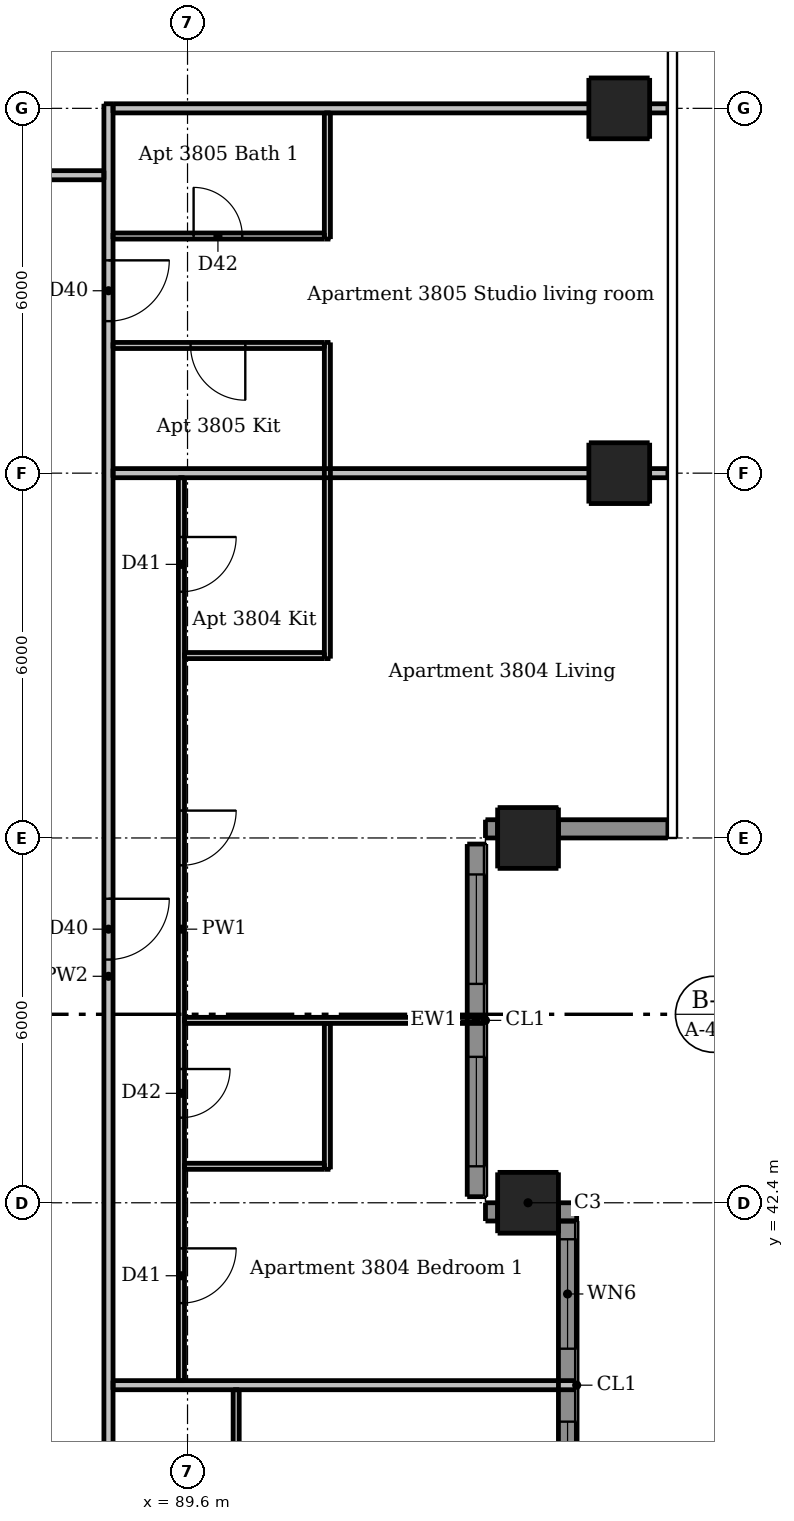
"""IFC4 building model, lengths in metres.
Left out: names, types, materials, properties, quantities, classifications, styles, units other than length and angle.
Written with IfcOpenShell. Run it as: python <this file> out.ifc"""

import sys

from ifc_helpers import new_model, si_unit, direction, frame, frame_2d, origin, origin_2d, place, context, subcontext, project, spatial, rectangle, extrude, element, fill, save


model = new_model("IFC4")
c1 = context("Model", 3, precision=1e-05, world=origin(), true_north=direction((0.0, 1.0)))
c2 = subcontext(c1, "Body", "Model", "MODEL_VIEW")
j1 = project(units=[si_unit("LENGTHUNIT", "METRE"), si_unit("PLANEANGLEUNIT", "RADIAN")], contexts=[c1])
p1 = place(None, origin())
s1 = spatial("IfcSite", under=j1, at=p1, CompositionType="ELEMENT")
p2 = place(p1, origin())
s2 = spatial("IfcBuilding", under=s1, at=p2, CompositionType="ELEMENT")
p3 = place(p2, frame((0.0, 0.0, 143.8)))
s3 = spatial("IfcBuildingStorey", under=s2, at=p3, CompositionType="ELEMENT", Elevation=143.8)
for number, where, z_axis, x_axis in (
    (1, (95.2, 42.4, 0.0), (0.0, 0.0, 1.0), (1.0, 0.0, 0.0)),
    (2, (95.2, 48.4, 0.0), (0.0, 0.0, 1.0), (1.0, 0.0, 0.0)),
    (3, (96.7, 54.4, 0.0), (0.0, 0.0, 1.0), (1.0, 0.0, 0.0)),
    (4, (96.7, 60.4, 0.0), (0.0, 0.0, 1.0), (1.0, 0.0, 0.0)),
):
    element("IfcColumn", number, at=place(p3, frame(where, z_axis=z_axis, x_axis=x_axis)), inside=s3, PredefinedType="COLUMN", context=c2, shape_type="SweptSolid", body=[
        extrude(rectangle(XDim=1.0, YDim=1.0, at=origin_2d()), origin(), (0.0, 0.0, 1.0), 3.05),
    ])
p4 = place(p3, frame((96.0, 42.25, 0.0), z_axis=(0.0, 0.0, 1.0), x_axis=(-1.0, 0.0, 0.0)))
e5 = element("IfcWall", 5, at=p4, inside=s3, PredefinedType="SOLIDWALL", context=c2, shape_type="SweptSolid", body=[
    extrude(rectangle(XDim=0.3, YDim=0.3, at=frame_2d((0.15, 0.0))), origin(), (0.0, 0.0, 1.0), 3.05),
])
for number, where, z_axis, x_axis in (
    (6, (94.7, 42.25, 0.0), (0.0, 0.0, 1.0), (-1.0, 0.0, 0.0)),
    (7, (94.5, 48.55, 0.0), (0.0, 0.0, 1.0), (1.0, 0.0, 0.0)),
):
    element("IfcWall", number, at=place(p3, frame(where, z_axis=z_axis, x_axis=x_axis)), inside=s3, PredefinedType="SOLIDWALL", context=c2, shape_type="SweptSolid", body=[
        extrude(rectangle(XDim=0.2, YDim=0.3, at=frame_2d((0.1, 0.0))), origin(), (0.0, 0.0, 1.0), 3.05),
    ])
p5 = place(p3, frame((95.7, 48.55, 0.0), z_axis=(0.0, 0.0, 1.0), x_axis=(1.0, 0.0, 0.0)))
e8 = element("IfcWall", 8, at=p5, inside=s3, PredefinedType="SOLIDWALL", context=c2, shape_type="SweptSolid", body=[
    extrude(rectangle(XDim=1.8, YDim=0.3, at=frame_2d((0.9, 0.0))), origin(), (0.0, 0.0, 1.0), 3.05),
])
p6 = place(p3, frame((95.85, 36.7, 0.0), z_axis=(0.0, 0.0, 1.0), x_axis=(0.0, 1.0, 0.0)))
e9 = element("IfcWall", 9, at=p6, inside=s3, PredefinedType="SOLIDWALL", context=c2, shape_type="SweptSolid", body=[
    extrude(rectangle(XDim=5.4, YDim=0.3, at=frame_2d((2.7, 0.0))), origin(), (0.0, 0.0, 1.0), 3.05),
])
p7 = place(p6, frame((0.3, 0.0, 0.15)))
e10 = element("IfcOpeningElement", 10, at=p7, cuts=e9, PredefinedType="OPENING", context=c2, shape_type="SweptSolid", body=[
    extrude(rectangle(XDim=1.8, YDim=2.1, at=frame_2d((0.9, 1.05))), frame((0.0, 0.16, 0.0), z_axis=(0.0, -1.0, 0.0), x_axis=(1.0, 0.0, 0.0)), (0.0, 0.0, 1.0), 0.32),
])
p8 = place(p6, frame((3.3, 0.0, 0.15)))
e11 = element("IfcOpeningElement", 11, at=p8, cuts=e9, PredefinedType="OPENING", context=c2, shape_type="SweptSolid", body=[
    extrude(rectangle(XDim=1.8, YDim=2.1, at=frame_2d((0.9, 1.05))), frame((0.0, 0.16, 0.0), z_axis=(0.0, -1.0, 0.0), x_axis=(1.0, 0.0, 0.0)), (0.0, 0.0, 1.0), 0.32),
])
p9 = place(p3, frame((94.35, 42.5, 0.0), z_axis=(0.0, 0.0, 1.0), x_axis=(0.0, 1.0, 0.0)))
e12 = element("IfcWall", 12, at=p9, inside=s3, PredefinedType="SOLIDWALL", context=c2, shape_type="SweptSolid", body=[
    extrude(rectangle(XDim=5.8, YDim=0.3, at=frame_2d((2.9, 0.0))), origin(), (0.0, 0.0, 1.0), 3.05),
])
p10 = place(p9, frame((0.5, 0.0, 0.15)))
e13 = element("IfcOpeningElement", 13, at=p10, cuts=e12, PredefinedType="OPENING", context=c2, shape_type="SweptSolid", body=[
    extrude(rectangle(XDim=1.8, YDim=2.1, at=frame_2d((0.9, 1.05))), frame((0.0, 0.16, 0.0), z_axis=(0.0, -1.0, 0.0), x_axis=(1.0, 0.0, 0.0)), (0.0, 0.0, 1.0), 0.32),
])
p11 = place(p9, frame((3.5, 0.0, 0.15)))
e14 = element("IfcOpeningElement", 14, at=p11, cuts=e12, PredefinedType="OPENING", context=c2, shape_type="SweptSolid", body=[
    extrude(rectangle(XDim=1.8, YDim=2.1, at=frame_2d((0.9, 1.05))), frame((0.0, 0.16, 0.0), z_axis=(0.0, -1.0, 0.0), x_axis=(1.0, 0.0, 0.0)), (0.0, 0.0, 1.0), 0.32),
])
p12 = place(p3, frame((89.5, 54.325, 0.0), z_axis=(0.0, 0.0, 1.0), x_axis=(0.0, -1.0, 0.0)))
e15 = element("IfcWall", 15, at=p12, inside=s3, PredefinedType="PARTITIONING", context=c2, shape_type="SweptSolid", body=[
    extrude(rectangle(XDim=14.85, YDim=0.1, at=frame_2d((7.425, 0.0))), origin(), (0.0, 0.0, 1.0), 3.05),
])
p13 = place(p12, frame((5.475, 0.0, 0.0)))
e16 = element("IfcOpeningElement", 16, at=p13, cuts=e15, PredefinedType="OPENING", context=c2, shape_type="SweptSolid", body=[
    extrude(rectangle(XDim=0.9, YDim=2.1, at=frame_2d((0.45, 1.05))), frame((0.0, 0.06, 0.0), z_axis=(0.0, -1.0, 0.0), x_axis=(1.0, 0.0, 0.0)), (0.0, 0.0, 1.0), 0.12),
])
p14 = place(p12, frame((0.975, 0.0, 0.0)))
e17 = element("IfcOpeningElement", 17, at=p14, cuts=e15, PredefinedType="OPENING", context=c2, shape_type="SweptSolid", body=[
    extrude(rectangle(XDim=0.9, YDim=2.1, at=frame_2d((0.45, 1.05))), frame((0.0, 0.06, 0.0), z_axis=(0.0, -1.0, 0.0), x_axis=(1.0, 0.0, 0.0)), (0.0, 0.0, 1.0), 0.12),
])
p15 = place(p12, frame((12.675, 0.0, 0.0)))
e18 = element("IfcOpeningElement", 18, at=p15, cuts=e15, PredefinedType="OPENING", context=c2, shape_type="SweptSolid", body=[
    extrude(rectangle(XDim=0.9, YDim=2.1, at=frame_2d((0.45, 1.05))), frame((0.0, 0.06, 0.0), z_axis=(0.0, -1.0, 0.0), x_axis=(1.0, 0.0, 0.0)), (0.0, 0.0, 1.0), 0.12),
])
p16 = place(p12, frame((9.725, 0.0, 0.0)))
e19 = element("IfcOpeningElement", 19, at=p16, cuts=e15, PredefinedType="OPENING", context=c2, shape_type="SweptSolid", body=[
    extrude(rectangle(XDim=0.8, YDim=2.1, at=frame_2d((0.4, 1.05))), frame((0.0, 0.06, 0.0), z_axis=(0.0, -1.0, 0.0), x_axis=(1.0, 0.0, 0.0)), (0.0, 0.0, 1.0), 0.12),
])
p17 = place(p3, frame((90.4, 33.45, 0.0), z_axis=(0.0, 0.0, 1.0), x_axis=(0.0, 1.0, 0.0)))
e20 = element("IfcWall", 20, at=p17, inside=s3, PredefinedType="PARTITIONING", context=c2, shape_type="SweptSolid", body=[
    extrude(rectangle(XDim=5.875, YDim=0.1, at=frame_2d((2.938, 0.0))), origin(), (0.0, 0.0, 1.0), 3.05),
])
p18 = place(p17, frame((3.75, 0.0, 0.0)))
e21 = element("IfcOpeningElement", 21, at=p18, cuts=e20, PredefinedType="OPENING", context=c2, shape_type="SweptSolid", body=[
    extrude(rectangle(XDim=0.8, YDim=2.1, at=frame_2d((0.4, 1.05))), frame((0.0, 0.06, 0.0), z_axis=(0.0, -1.0, 0.0), x_axis=(1.0, 0.0, 0.0)), (0.0, 0.0, 1.0), 0.12),
])
p19 = place(p3, frame((91.9, 42.95, 0.0), z_axis=(0.0, 0.0, 1.0), x_axis=(0.0, 1.0, 0.0)))
e22 = element("IfcWall", 22, at=p19, inside=s3, PredefinedType="PARTITIONING", context=c2, shape_type="SweptSolid", body=[
    extrude(rectangle(XDim=2.4, YDim=0.1, at=frame_2d((1.2, 0.0))), origin(), (0.0, 0.0, 1.0), 3.05),
])
p20 = place(p3, frame((91.9, 51.35, 0.0), z_axis=(0.0, 0.0, 1.0), x_axis=(0.0, 1.0, 0.0)))
e23 = element("IfcWall", 23, at=p20, inside=s3, PredefinedType="PARTITIONING", context=c2, shape_type="SweptSolid", body=[
    extrude(rectangle(XDim=5.2, YDim=0.1, at=frame_2d((2.6, 0.0))), origin(), (0.0, 0.0, 1.0), 3.05),
])
p21 = place(p3, frame((91.9, 58.25, 0.0), z_axis=(0.0, 0.0, 1.0), x_axis=(0.0, 1.0, 0.0)))
e24 = element("IfcWall", 24, at=p21, inside=s3, PredefinedType="PARTITIONING", context=c2, shape_type="SweptSolid", body=[
    extrude(rectangle(XDim=2.075, YDim=0.1, at=frame_2d((1.038, 0.0))), origin(), (0.0, 0.0, 1.0), 3.05),
])
p22 = place(p3, frame((88.375, 58.3, 0.0), z_axis=(0.0, 0.0, 1.0), x_axis=(1.0, 0.0, 0.0)))
e25 = element("IfcWall", 25, at=p22, inside=s3, PredefinedType="PARTITIONING", context=c2, shape_type="SweptSolid", body=[
    extrude(rectangle(XDim=3.475, YDim=0.1, at=frame_2d((1.738, 0.0))), origin(), (0.0, 0.0, 1.0), 3.05),
])
p23 = place(p22, frame((1.325, 0.0, 0.0)))
e26 = element("IfcOpeningElement", 26, at=p23, cuts=e25, PredefinedType="OPENING", context=c2, shape_type="SweptSolid", body=[
    extrude(rectangle(XDim=0.8, YDim=2.1, at=frame_2d((0.4, 1.05))), frame((0.0, 0.06, 0.0), z_axis=(0.0, -1.0, 0.0), x_axis=(1.0, 0.0, 0.0)), (0.0, 0.0, 1.0), 0.12),
])
p24 = place(p3, frame((91.85, 56.5, 0.0), z_axis=(0.0, 0.0, 1.0), x_axis=(-1.0, 0.0, 0.0)))
e27 = element("IfcWall", 27, at=p24, inside=s3, PredefinedType="PARTITIONING", context=c2, shape_type="SweptSolid", body=[
    extrude(rectangle(XDim=3.475, YDim=0.1, at=frame_2d((1.738, 0.0))), origin(), (0.0, 0.0, 1.0), 3.05),
])
p25 = place(p24, frame((1.3, 0.0, 0.0)))
e28 = element("IfcOpeningElement", 28, at=p25, cuts=e27, PredefinedType="OPENING", context=c2, shape_type="SweptSolid", body=[
    extrude(rectangle(XDim=0.9, YDim=2.1, at=frame_2d((0.45, 1.05))), frame((0.0, 0.06, 0.0), z_axis=(0.0, -1.0, 0.0), x_axis=(1.0, 0.0, 0.0)), (0.0, 0.0, 1.0), 0.12),
])
p26 = place(p3, frame((89.55, 51.4, 0.0), z_axis=(0.0, 0.0, 1.0), x_axis=(1.0, 0.0, 0.0)))
e29 = element("IfcWall", 29, at=p26, inside=s3, PredefinedType="PARTITIONING", context=c2, shape_type="SweptSolid", body=[
    extrude(rectangle(XDim=2.3, YDim=0.1, at=frame_2d((1.15, 0.0))), origin(), (0.0, 0.0, 1.0), 3.05),
])
p27 = place(p3, frame((89.55, 45.4, 0.0), z_axis=(0.0, 0.0, 1.0), x_axis=(1.0, 0.0, 0.0)))
e30 = element("IfcWall", 30, at=p27, inside=s3, PredefinedType="PARTITIONING", context=c2, shape_type="SweptSolid", body=[
    extrude(rectangle(XDim=4.95, YDim=0.1, at=frame_2d((2.475, 0.0))), origin(), (0.0, 0.0, 1.0), 3.05),
])
p28 = place(p3, frame((89.55, 43.0, 0.0), z_axis=(0.0, 0.0, 1.0), x_axis=(1.0, 0.0, 0.0)))
e31 = element("IfcWall", 31, at=p28, inside=s3, PredefinedType="PARTITIONING", context=c2, shape_type="SweptSolid", body=[
    extrude(rectangle(XDim=2.3, YDim=0.1, at=frame_2d((1.15, 0.0))), origin(), (0.0, 0.0, 1.0), 3.05),
])
p29 = place(p3, frame((88.3, 60.475, 0.0), z_axis=(0.0, 0.0, 1.0), x_axis=(0.0, -1.0, 0.0)))
e32 = element("IfcWall", 32, at=p29, inside=s3, PredefinedType="PARTITIONING", context=c2, shape_type="SweptSolid", body=[
    extrude(rectangle(XDim=28.7, YDim=0.15, at=frame_2d((14.35, 0.0))), origin(), (0.0, 0.0, 1.0), 3.05),
])
p30 = place(p29, frame((27.425, 0.0, 0.0)))
e33 = element("IfcOpeningElement", 33, at=p30, cuts=e32, PredefinedType="OPENING", context=c2, shape_type="SweptSolid", body=[
    extrude(rectangle(XDim=1.0, YDim=2.1, at=frame_2d((0.5, 1.05))), frame((0.0, 0.085, 0.0), z_axis=(0.0, -1.0, 0.0), x_axis=(1.0, 0.0, 0.0)), (0.0, 0.0, 1.0), 0.17),
])
p31 = place(p29, frame((13.075, 0.0, 0.0)))
e34 = element("IfcOpeningElement", 34, at=p31, cuts=e32, PredefinedType="OPENING", context=c2, shape_type="SweptSolid", body=[
    extrude(rectangle(XDim=1.0, YDim=2.1, at=frame_2d((0.5, 1.05))), frame((0.0, 0.085, 0.0), z_axis=(0.0, -1.0, 0.0), x_axis=(1.0, 0.0, 0.0)), (0.0, 0.0, 1.0), 0.17),
])
p32 = place(p29, frame((2.575, 0.0, 0.0)))
e35 = element("IfcOpeningElement", 35, at=p32, cuts=e32, PredefinedType="OPENING", context=c2, shape_type="SweptSolid", body=[
    extrude(rectangle(XDim=1.0, YDim=2.1, at=frame_2d((0.5, 1.05))), frame((0.0, 0.085, 0.0), z_axis=(0.0, -1.0, 0.0), x_axis=(1.0, 0.0, 0.0)), (0.0, 0.0, 1.0), 0.17),
])
p33 = place(p3, frame((88.375, 60.4, 0.0), z_axis=(0.0, 0.0, 1.0), x_axis=(1.0, 0.0, 0.0)))
e36 = element("IfcWall", 36, at=p33, inside=s3, PredefinedType="PARTITIONING", context=c2, shape_type="SweptSolid", body=[
    extrude(rectangle(XDim=9.125, YDim=0.15, at=frame_2d((4.562, 0.0))), origin(), (0.0, 0.0, 1.0), 2.647),
])
p34 = place(p3, frame((59.675, 59.3, 0.0), z_axis=(0.0, 0.0, 1.0), x_axis=(1.0, 0.0, 0.0)))
e37 = element("IfcWall", 37, at=p34, inside=s3, PredefinedType="PARTITIONING", context=c2, shape_type="SweptSolid", body=[
    extrude(rectangle(XDim=28.55, YDim=0.15, at=frame_2d((14.275, 0.0))), origin(), (0.0, 0.0, 1.0), 3.05),
])
p35 = place(p34, frame((8.975, 0.0, 0.0)))
e38 = element("IfcOpeningElement", 38, at=p35, cuts=e37, PredefinedType="OPENING", context=c2, shape_type="SweptSolid", body=[
    extrude(rectangle(XDim=1.0, YDim=2.1, at=frame_2d((0.5, 1.05))), frame((0.0, 0.085, 0.0), z_axis=(0.0, -1.0, 0.0), x_axis=(1.0, 0.0, 0.0)), (0.0, 0.0, 1.0), 0.17),
])
p36 = place(p34, frame((25.775, 0.0, 0.0)))
e39 = element("IfcOpeningElement", 39, at=p36, cuts=e37, PredefinedType="OPENING", context=c2, shape_type="SweptSolid", body=[
    extrude(rectangle(XDim=1.0, YDim=2.1, at=frame_2d((0.5, 1.05))), frame((0.0, 0.085, 0.0), z_axis=(0.0, -1.0, 0.0), x_axis=(1.0, 0.0, 0.0)), (0.0, 0.0, 1.0), 0.17),
])
p37 = place(p3, frame((88.375, 54.4, 0.0), z_axis=(0.0, 0.0, 1.0), x_axis=(1.0, 0.0, 0.0)))
e40 = element("IfcWall", 40, at=p37, inside=s3, PredefinedType="PARTITIONING", context=c2, shape_type="SweptSolid", body=[
    extrude(rectangle(XDim=9.125, YDim=0.15, at=frame_2d((4.562, 0.0))), origin(), (0.0, 0.0, 1.0), 2.516),
])
p38 = place(p3, frame((88.375, 39.4, 0.0), z_axis=(0.0, 0.0, 1.0), x_axis=(1.0, 0.0, 0.0)))
e41 = element("IfcWall", 41, at=p38, inside=s3, PredefinedType="PARTITIONING", context=c2, shape_type="SweptSolid", body=[
    extrude(rectangle(XDim=7.625, YDim=0.15, at=frame_2d((3.812, 0.0))), origin(), (0.0, 0.0, 1.0), 3.05),
])
p39 = place(p7, origin())
e42 = element("IfcWindow", 42, at=p39, inside=s3, PartitioningType="DOUBLE_PANEL_VERTICAL", PredefinedType="WINDOW", context=c2, shape_type="SweptSolid", body=[
    extrude(rectangle(XDim=1.8, YDim=2.1, at=frame_2d((0.9, 1.05))), frame((0.0, 0.03, 0.0), z_axis=(0.0, -1.0, 0.0), x_axis=(1.0, 0.0, 0.0)), (0.0, 0.0, 1.0), 0.06),
])
fill(e10, e42)
p40 = place(p8, origin())
e43 = element("IfcWindow", 43, at=p40, inside=s3, PartitioningType="DOUBLE_PANEL_VERTICAL", PredefinedType="WINDOW", context=c2, shape_type="SweptSolid", body=[
    extrude(rectangle(XDim=1.8, YDim=2.1, at=frame_2d((0.9, 1.05))), frame((0.0, 0.03, 0.0), z_axis=(0.0, -1.0, 0.0), x_axis=(1.0, 0.0, 0.0)), (0.0, 0.0, 1.0), 0.06),
])
fill(e11, e43)
p41 = place(p10, origin())
e44 = element("IfcWindow", 44, at=p41, inside=s3, PartitioningType="DOUBLE_PANEL_VERTICAL", PredefinedType="WINDOW", context=c2, shape_type="SweptSolid", body=[
    extrude(rectangle(XDim=1.8, YDim=2.1, at=frame_2d((0.9, 1.05))), frame((0.0, 0.03, 0.0), z_axis=(0.0, -1.0, 0.0), x_axis=(1.0, 0.0, 0.0)), (0.0, 0.0, 1.0), 0.06),
])
fill(e13, e44)
p42 = place(p11, origin())
e45 = element("IfcWindow", 45, at=p42, inside=s3, PartitioningType="DOUBLE_PANEL_VERTICAL", PredefinedType="WINDOW", context=c2, shape_type="SweptSolid", body=[
    extrude(rectangle(XDim=1.8, YDim=2.1, at=frame_2d((0.9, 1.05))), frame((0.0, 0.03, 0.0), z_axis=(0.0, -1.0, 0.0), x_axis=(1.0, 0.0, 0.0)), (0.0, 0.0, 1.0), 0.06),
])
fill(e14, e45)
p43 = place(p31, origin())
e46 = element("IfcDoor", 46, at=p43, inside=s3, OperationType="SINGLE_SWING_LEFT", PredefinedType="DOOR", context=c2, shape_type="SweptSolid", body=[
    extrude(rectangle(XDim=1.0, YDim=2.1, at=frame_2d((0.5, 1.05))), frame((0.0, 0.025, 0.0), z_axis=(0.0, -1.0, 0.0), x_axis=(1.0, 0.0, 0.0)), (0.0, 0.0, 1.0), 0.05),
])
fill(e34, e46)
p44 = place(p13, origin())
e47 = element("IfcDoor", 47, at=p44, inside=s3, OperationType="SINGLE_SWING_LEFT", PredefinedType="DOOR", context=c2, shape_type="SweptSolid", body=[
    extrude(rectangle(XDim=0.9, YDim=2.1, at=frame_2d((0.45, 1.05))), frame((0.0, 0.025, 0.0), z_axis=(0.0, -1.0, 0.0), x_axis=(1.0, 0.0, 0.0)), (0.0, 0.0, 1.0), 0.05),
])
fill(e16, e47)
p45 = place(p14, origin())
e48 = element("IfcDoor", 48, at=p45, inside=s3, OperationType="SINGLE_SWING_LEFT", PredefinedType="DOOR", context=c2, shape_type="SweptSolid", body=[
    extrude(rectangle(XDim=0.9, YDim=2.1, at=frame_2d((0.45, 1.05))), frame((0.0, 0.025, 0.0), z_axis=(0.0, -1.0, 0.0), x_axis=(1.0, 0.0, 0.0)), (0.0, 0.0, 1.0), 0.05),
])
fill(e17, e48)
p46 = place(p15, origin())
e49 = element("IfcDoor", 49, at=p46, inside=s3, OperationType="SINGLE_SWING_LEFT", PredefinedType="DOOR", context=c2, shape_type="SweptSolid", body=[
    extrude(rectangle(XDim=0.9, YDim=2.1, at=frame_2d((0.45, 1.05))), frame((0.0, 0.025, 0.0), z_axis=(0.0, -1.0, 0.0), x_axis=(1.0, 0.0, 0.0)), (0.0, 0.0, 1.0), 0.05),
])
fill(e18, e49)
p47 = place(p16, origin())
e50 = element("IfcDoor", 50, at=p47, inside=s3, OperationType="SINGLE_SWING_LEFT", PredefinedType="DOOR", context=c2, shape_type="SweptSolid", body=[
    extrude(rectangle(XDim=0.8, YDim=2.1, at=frame_2d((0.4, 1.05))), frame((0.0, 0.025, 0.0), z_axis=(0.0, -1.0, 0.0), x_axis=(1.0, 0.0, 0.0)), (0.0, 0.0, 1.0), 0.05),
])
fill(e19, e50)
p48 = place(p32, origin())
e51 = element("IfcDoor", 51, at=p48, inside=s3, OperationType="SINGLE_SWING_LEFT", PredefinedType="DOOR", context=c2, shape_type="SweptSolid", body=[
    extrude(rectangle(XDim=1.0, YDim=2.1, at=frame_2d((0.5, 1.05))), frame((0.0, 0.025, 0.0), z_axis=(0.0, -1.0, 0.0), x_axis=(1.0, 0.0, 0.0)), (0.0, 0.0, 1.0), 0.05),
])
fill(e35, e51)
p49 = place(p25, origin())
e52 = element("IfcDoor", 52, at=p49, inside=s3, OperationType="SINGLE_SWING_LEFT", PredefinedType="DOOR", context=c2, shape_type="SweptSolid", body=[
    extrude(rectangle(XDim=0.9, YDim=2.1, at=frame_2d((0.45, 1.05))), frame((0.0, 0.025, 0.0), z_axis=(0.0, -1.0, 0.0), x_axis=(1.0, 0.0, 0.0)), (0.0, 0.0, 1.0), 0.05),
])
fill(e28, e52)
p50 = place(p23, origin())
e53 = element("IfcDoor", 53, at=p50, inside=s3, OperationType="SINGLE_SWING_LEFT", PredefinedType="DOOR", context=c2, shape_type="SweptSolid", body=[
    extrude(rectangle(XDim=0.8, YDim=2.1, at=frame_2d((0.4, 1.05))), frame((0.0, 0.025, 0.0), z_axis=(0.0, -1.0, 0.0), x_axis=(1.0, 0.0, 0.0)), (0.0, 0.0, 1.0), 0.05),
])
fill(e26, e53)
save(model, sys.argv[1])
